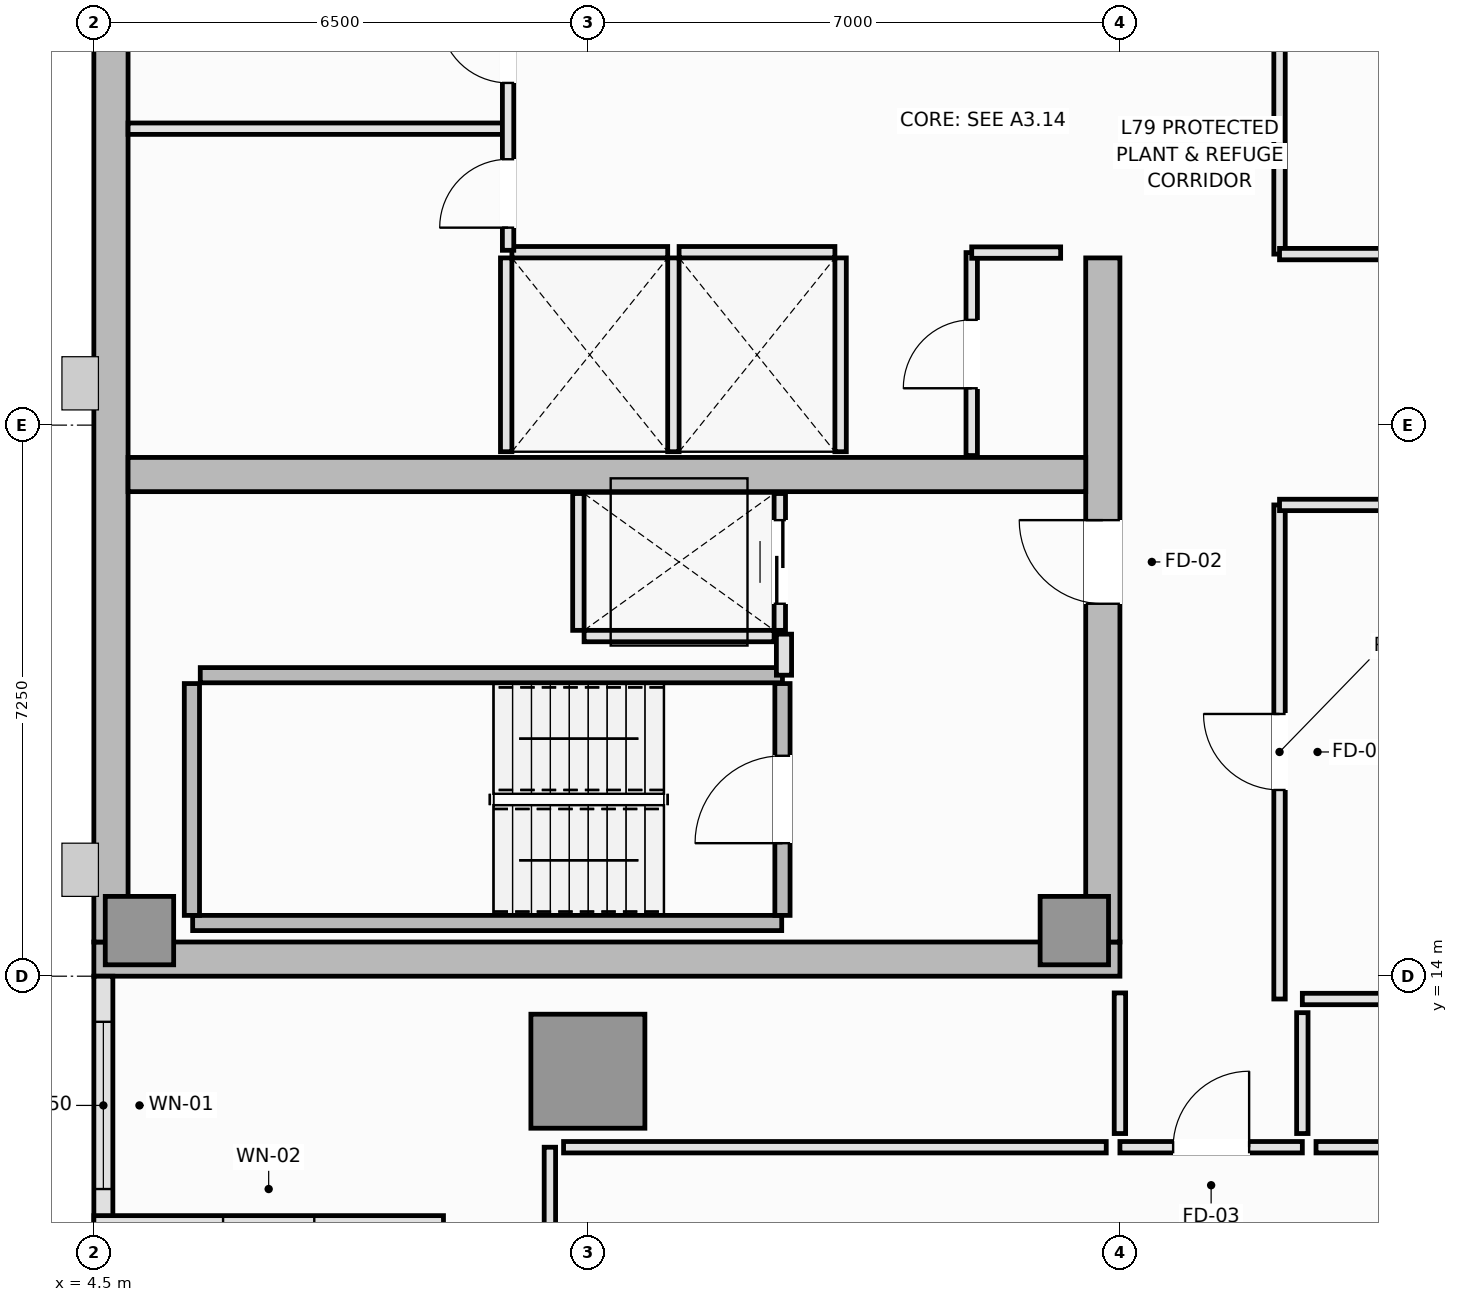
"""IFC4 building model, lengths in metres.
Left out: names, types, materials, properties, quantities, classifications, styles, units other than length and angle.
Written with IfcOpenShell. Run it as: python <this file> out.ifc"""

import sys

from ifc_helpers import new_model, si_unit, direction, frame, frame_2d, origin, origin_2d, place, context, subcontext, project, spatial, rectangle, extrude, element, fill, save


model = new_model("IFC4")
c1 = context("Model", 3, precision=1e-05, world=origin(), true_north=direction((0.0, 1.0)))
c2 = subcontext(c1, "Body", "Model", "MODEL_VIEW")
j1 = project(units=[si_unit("LENGTHUNIT", "METRE"), si_unit("PLANEANGLEUNIT", "RADIAN")], contexts=[c1])
p1 = place(None, origin())
s1 = spatial("IfcSite", under=j1, at=p1, CompositionType="ELEMENT")
p2 = place(p1, origin())
s2 = spatial("IfcBuilding", under=s1, at=p2, CompositionType="ELEMENT")
p3 = place(p2, frame((0.0, 0.0, 296.65)))
s3 = spatial("IfcBuildingStorey", under=s2, at=p3, CompositionType="ELEMENT", Elevation=296.65)
p4 = place(p3, frame((4.5, 14.225, 0.0), z_axis=(0.0, 0.0, 1.0), x_axis=(1.0, 0.0, 0.0)))
e1 = element("IfcWall", 1, at=p4, inside=s3, PredefinedType="SHEAR", context=c2, shape_type="SweptSolid", body=[
    extrude(rectangle(XDim=13.5, YDim=0.45, at=frame_2d((6.75, 0.0))), origin(), (0.0, 0.0, 1.0), 6.4),
])
p5 = place(p3, frame((4.725, 14.45, 0.0), z_axis=(0.0, 0.0, 1.0), x_axis=(0.0, 1.0, 0.0)))
e2 = element("IfcWall", 2, at=p5, inside=s3, PredefinedType="SHEAR", context=c2, shape_type="SweptSolid", body=[
    extrude(rectangle(XDim=21.6, YDim=0.45, at=frame_2d((10.8, 0.0))), origin(), (0.0, 0.0, 1.0), 6.4),
])
p6 = place(p3, frame((17.775, 14.45, 0.0), z_axis=(0.0, 0.0, 1.0), x_axis=(0.0, 1.0, 0.0)))
e3 = element("IfcWall", 3, at=p6, inside=s3, PredefinedType="SHEAR", context=c2, shape_type="SweptSolid", body=[
    extrude(rectangle(XDim=9.0, YDim=0.45, at=frame_2d((4.5, 0.0))), origin(), (0.0, 0.0, 1.0), 6.4),
])
p7 = place(p6, frame((4.45, 0.0, 0.0)))
e4 = element("IfcOpeningElement", 4, at=p7, cuts=e3, PredefinedType="OPENING", context=c2, shape_type="SweptSolid", body=[
    extrude(rectangle(XDim=1.1, YDim=2.15, at=frame_2d((0.55, 1.075))), frame((0.0, 0.235, 0.0), z_axis=(0.0, -1.0, 0.0), x_axis=(1.0, 0.0, 0.0)), (0.0, 0.0, 1.0), 0.47),
])
p8 = place(p3, frame((4.95, 20.6, 0.0), z_axis=(0.0, 0.0, 1.0), x_axis=(1.0, 0.0, 0.0)))
e5 = element("IfcWall", 5, at=p8, inside=s3, PredefinedType="SHEAR", context=c2, shape_type="SweptSolid", body=[
    extrude(rectangle(XDim=12.6, YDim=0.45, at=frame_2d((6.3, 0.0))), origin(), (0.0, 0.0, 1.0), 6.4),
])
for number, where, z_axis, x_axis in (
    (6, (5.1, 14.6, 0.0), (0.0, 0.0, 1.0), (1.0, 0.0, 0.0)),
    (7, (17.4, 14.6, 0.0), (0.0, 0.0, 1.0), (1.0, 0.0, 0.0)),
):
    element("IfcColumn", number, at=place(p3, frame(where, z_axis=z_axis, x_axis=x_axis)), inside=s3, PredefinedType="PILASTER", context=c2, shape_type="SweptSolid", body=[
        extrude(rectangle(XDim=0.9, YDim=0.9, at=origin_2d()), origin(), (0.0, 0.0, 1.0), 6.4),
    ])
p9 = place(p3, frame((11.0, 12.75, 0.0), z_axis=(0.0, 0.0, 1.0), x_axis=(1.0, 0.0, 0.0)))
e8 = element("IfcColumn", 8, at=p9, inside=s3, PredefinedType="COLUMN", context=c2, shape_type="SweptSolid", body=[
    extrude(rectangle(XDim=1.5, YDim=1.5, at=origin_2d()), origin(), (0.0, 0.0, 1.0), 6.4),
])
p10 = place(p3, frame((4.625, 14.0, 0.0), z_axis=(0.0, 0.0, 1.0), x_axis=(0.0, -1.0, 0.0)))
e9 = element("IfcWall", 9, at=p10, inside=s3, PredefinedType="SOLIDWALL", context=c2, shape_type="SweptSolid", body=[
    extrude(rectangle(XDim=3.4, YDim=0.25, at=frame_2d((1.7, 0.0))), origin(), (0.0, 0.0, 1.0), 6.2),
])
p11 = place(p10, frame((0.6, 0.0, 0.9)))
e10 = element("IfcOpeningElement", 10, at=p11, cuts=e9, PredefinedType="OPENING", context=c2, shape_type="SweptSolid", body=[
    extrude(rectangle(XDim=2.2, YDim=1.8, at=frame_2d((1.1, 0.9))), frame((0.0, 0.135, 0.0), z_axis=(0.0, -1.0, 0.0), x_axis=(1.0, 0.0, 0.0)), (0.0, 0.0, 1.0), 0.27),
])
p12 = place(p3, frame((4.5, 10.725, 0.0), z_axis=(0.0, 0.0, 1.0), x_axis=(1.0, 0.0, 0.0)))
e11 = element("IfcWall", 11, at=p12, inside=s3, PredefinedType="SOLIDWALL", context=c2, shape_type="SweptSolid", body=[
    extrude(rectangle(XDim=4.6, YDim=0.25, at=frame_2d((2.3, 0.0))), origin(), (0.0, 0.0, 1.0), 6.2),
])
p13 = place(p12, frame((1.7, 0.0, 0.9)))
e12 = element("IfcOpeningElement", 12, at=p13, cuts=e11, PredefinedType="OPENING", context=c2, shape_type="SweptSolid", body=[
    extrude(rectangle(XDim=1.2, YDim=1.8, at=frame_2d((0.6, 0.9))), frame((0.0, 0.135, 0.0), z_axis=(0.0, -1.0, 0.0), x_axis=(1.0, 0.0, 0.0)), (0.0, 0.0, 1.0), 0.27),
])
p14 = place(p3, frame((5.8, 14.7, 0.0), z_axis=(0.0, 0.0, 1.0), x_axis=(1.0, 0.0, 0.0)))
e13 = element("IfcWall", 13, at=p14, inside=s3, PredefinedType="SOLIDWALL", context=c2, shape_type="SweptSolid", body=[
    extrude(rectangle(XDim=7.75, YDim=0.2, at=frame_2d((3.875, 0.0))), origin(), (0.0, 0.0, 1.0), 6.4),
])
p15 = place(p3, frame((5.79, 14.8, 0.0), z_axis=(0.0, 0.0, 1.0), x_axis=(0.0, 1.0, 0.0)))
e14 = element("IfcWall", 14, at=p15, inside=s3, PredefinedType="SOLIDWALL", context=c2, shape_type="SweptSolid", body=[
    extrude(rectangle(XDim=3.05, YDim=0.2, at=frame_2d((1.525, 0.0))), origin(), (0.0, 0.0, 1.0), 6.4),
])
p16 = place(p3, frame((5.9, 17.96, 0.0), z_axis=(0.0, 0.0, 1.0), x_axis=(1.0, 0.0, 0.0)))
e15 = element("IfcWall", 15, at=p16, inside=s3, PredefinedType="SOLIDWALL", context=c2, shape_type="SweptSolid", body=[
    extrude(rectangle(XDim=7.66, YDim=0.2, at=frame_2d((3.83, 0.0))), origin(), (0.0, 0.0, 1.0), 6.4),
])
p17 = place(p3, frame((13.56, 14.8, 0.0), z_axis=(0.0, 0.0, 1.0), x_axis=(0.0, 1.0, 0.0)))
e16 = element("IfcWall", 16, at=p17, inside=s3, PredefinedType="SOLIDWALL", context=c2, shape_type="SweptSolid", body=[
    extrude(rectangle(XDim=3.05, YDim=0.2, at=frame_2d((1.525, 0.0))), origin(), (0.0, 0.0, 1.0), 6.4),
])
p18 = place(p17, frame((0.95, 0.0, 0.0)))
e17 = element("IfcOpeningElement", 17, at=p18, cuts=e16, PredefinedType="OPENING", context=c2, shape_type="SweptSolid", body=[
    extrude(rectangle(XDim=1.15, YDim=2.15, at=frame_2d((0.575, 1.075))), frame((0.0, 0.11, 0.0), z_axis=(0.0, -1.0, 0.0), x_axis=(1.0, 0.0, 0.0)), (0.0, 0.0, 1.0), 0.22),
])
p19 = place(p3, frame((10.0, 23.525, 0.0), z_axis=(0.0, 0.0, 1.0), x_axis=(1.0, 0.0, 0.0)))
e18 = element("IfcWall", 18, at=p19, inside=s3, PredefinedType="PARTITIONING", context=c2, shape_type="SweptSolid", body=[
    extrude(rectangle(XDim=2.05, YDim=0.15, at=frame_2d((1.025, 0.0))), origin(), (0.0, 0.0, 1.0), 6.2),
])
for number, where, z_axis, x_axis in (
    (19, (9.925, 20.9, 0.0), (0.0, 0.0, 1.0), (0.0, 1.0, 0.0)),
    (20, (12.125, 20.9, 0.0), (0.0, 0.0, 1.0), (0.0, 1.0, 0.0)),
):
    element("IfcWall", number, at=place(p3, frame(where, z_axis=z_axis, x_axis=x_axis)), inside=s3, PredefinedType="PARTITIONING", context=c2, shape_type="SweptSolid", body=[
        extrude(rectangle(XDim=2.55, YDim=0.15, at=frame_2d((1.275, 0.0))), origin(), (0.0, 0.0, 1.0), 6.2),
    ])
p20 = place(p3, frame((12.2, 23.525, 0.0), z_axis=(0.0, 0.0, 1.0), x_axis=(1.0, 0.0, 0.0)))
e21 = element("IfcWall", 21, at=p20, inside=s3, PredefinedType="PARTITIONING", context=c2, shape_type="SweptSolid", body=[
    extrude(rectangle(XDim=2.05, YDim=0.15, at=frame_2d((1.025, 0.0))), origin(), (0.0, 0.0, 1.0), 6.2),
])
p21 = place(p3, frame((14.325, 20.9, 0.0), z_axis=(0.0, 0.0, 1.0), x_axis=(0.0, 1.0, 0.0)))
e22 = element("IfcWall", 22, at=p21, inside=s3, PredefinedType="PARTITIONING", context=c2, shape_type="SweptSolid", body=[
    extrude(rectangle(XDim=2.55, YDim=0.15, at=frame_2d((1.275, 0.0))), origin(), (0.0, 0.0, 1.0), 6.2),
])
p22 = place(p3, frame((10.95, 18.475, 0.0), z_axis=(0.0, 0.0, 1.0), x_axis=(1.0, 0.0, 0.0)))
e23 = element("IfcWall", 23, at=p22, inside=s3, PredefinedType="PARTITIONING", context=c2, shape_type="SweptSolid", body=[
    extrude(rectangle(XDim=2.5, YDim=0.15, at=frame_2d((1.25, 0.0))), origin(), (0.0, 0.0, 1.0), 6.2),
])
p23 = place(p3, frame((10.875, 18.55, 0.0), z_axis=(0.0, 0.0, 1.0), x_axis=(0.0, 1.0, 0.0)))
e24 = element("IfcWall", 24, at=p23, inside=s3, PredefinedType="PARTITIONING", context=c2, shape_type="SweptSolid", body=[
    extrude(rectangle(XDim=1.8, YDim=0.15, at=frame_2d((0.9, 0.0))), origin(), (0.0, 0.0, 1.0), 6.2),
])
p24 = place(p3, frame((13.525, 18.55, 0.0), z_axis=(0.0, 0.0, 1.0), x_axis=(0.0, 1.0, 0.0)))
e25 = element("IfcWall", 25, at=p24, inside=s3, PredefinedType="PARTITIONING", context=c2, shape_type="SweptSolid", body=[
    extrude(rectangle(XDim=1.8, YDim=0.15, at=frame_2d((0.9, 0.0))), origin(), (0.0, 0.0, 1.0), 6.2),
])
p25 = place(p24, frame((0.35, 0.0, 0.0)))
e26 = element("IfcOpeningElement", 26, at=p25, cuts=e25, PredefinedType="OPENING", context=c2, shape_type="SweptSolid", body=[
    extrude(rectangle(XDim=1.1, YDim=2.2, at=frame_2d((0.55, 1.1))), frame((0.0, 0.085, 0.0), z_axis=(0.0, -1.0, 0.0), x_axis=(1.0, 0.0, 0.0)), (0.0, 0.0, 1.0), 0.17),
])
p26 = place(p3, frame((13.58, 17.96, 0.0), z_axis=(0.0, 0.0, 1.0), x_axis=(0.0, 1.0, 0.0)))
e27 = element("IfcWall", 27, at=p26, inside=s3, PredefinedType="PARTITIONING", context=c2, shape_type="SweptSolid", body=[
    extrude(rectangle(XDim=0.54, YDim=0.2, at=frame_2d((0.27, 0.0))), origin(), (0.0, 0.0, 1.0), 6.2),
])
p27 = place(p3, frame((4.95, 25.15, 0.0), z_axis=(0.0, 0.0, 1.0), x_axis=(1.0, 0.0, 0.0)))
e28 = element("IfcWall", 28, at=p27, inside=s3, PredefinedType="PARTITIONING", context=c2, shape_type="SweptSolid", body=[
    extrude(rectangle(XDim=5.0, YDim=0.15, at=frame_2d((2.5, 0.0))), origin(), (0.0, 0.0, 1.0), 6.2),
])
p28 = place(p3, frame((9.95, 23.55, 0.0), z_axis=(0.0, 0.0, 1.0), x_axis=(0.0, 1.0, 0.0)))
e29 = element("IfcWall", 29, at=p28, inside=s3, PredefinedType="PARTITIONING", context=c2, shape_type="SweptSolid", body=[
    extrude(rectangle(XDim=3.4, YDim=0.15, at=frame_2d((1.7, 0.0))), origin(), (0.0, 0.0, 1.0), 6.2),
])
p29 = place(p28, frame((0.298, 0.0, 0.0)))
e30 = element("IfcOpeningElement", 30, at=p29, cuts=e29, PredefinedType="OPENING", context=c2, shape_type="SweptSolid", body=[
    extrude(rectangle(XDim=0.9, YDim=2.1, at=frame_2d((0.45, 1.05))), frame((0.0, 0.085, 0.0), z_axis=(0.0, -1.0, 0.0), x_axis=(1.0, 0.0, 0.0)), (0.0, 0.0, 1.0), 0.17),
])
p30 = place(p28, frame((2.202, 0.0, 0.0)))
e31 = element("IfcOpeningElement", 31, at=p30, cuts=e29, PredefinedType="OPENING", context=c2, shape_type="SweptSolid", body=[
    extrude(rectangle(XDim=0.9, YDim=2.1, at=frame_2d((0.45, 1.05))), frame((0.0, 0.085, 0.0), z_axis=(0.0, -1.0, 0.0), x_axis=(1.0, 0.0, 0.0)), (0.0, 0.0, 1.0), 0.17),
])
p31 = place(p3, frame((16.05, 20.85, 0.0), z_axis=(0.0, 0.0, 1.0), x_axis=(0.0, 1.0, 0.0)))
e32 = element("IfcWall", 32, at=p31, inside=s3, PredefinedType="PARTITIONING", context=c2, shape_type="SweptSolid", body=[
    extrude(rectangle(XDim=2.67, YDim=0.15, at=frame_2d((1.335, 0.0))), origin(), (0.0, 0.0, 1.0), 6.2),
])
p32 = place(p31, frame((0.885, 0.0, 0.0)))
e33 = element("IfcOpeningElement", 33, at=p32, cuts=e32, PredefinedType="OPENING", context=c2, shape_type="SweptSolid", body=[
    extrude(rectangle(XDim=0.9, YDim=2.1, at=frame_2d((0.45, 1.05))), frame((0.0, 0.085, 0.0), z_axis=(0.0, -1.0, 0.0), x_axis=(1.0, 0.0, 0.0)), (0.0, 0.0, 1.0), 0.17),
])
p33 = place(p3, frame((16.05, 23.52, 0.0), z_axis=(0.0, 0.0, 1.0), x_axis=(1.0, 0.0, 0.0)))
e34 = element("IfcWall", 34, at=p33, inside=s3, PredefinedType="PARTITIONING", context=c2, shape_type="SweptSolid", body=[
    extrude(rectangle(XDim=1.17, YDim=0.15, at=frame_2d((0.585, 0.0))), origin(), (0.0, 0.0, 1.0), 6.2),
])
p34 = place(p3, frame((20.1, 13.7, 0.0), z_axis=(0.0, 0.0, 1.0), x_axis=(0.0, 1.0, 0.0)))
e35 = element("IfcWall", 35, at=p34, inside=s3, PredefinedType="PARTITIONING", context=c2, shape_type="SweptSolid", body=[
    extrude(rectangle(XDim=6.5, YDim=0.15, at=frame_2d((3.25, 0.0))), origin(), (0.0, 0.0, 1.0), 6.2),
])
p35 = place(p34, frame((2.75, 0.0, 0.0)))
e36 = element("IfcOpeningElement", 36, at=p35, cuts=e35, PredefinedType="OPENING", context=c2, shape_type="SweptSolid", body=[
    extrude(rectangle(XDim=1.0, YDim=2.15, at=frame_2d((0.5, 1.075))), frame((0.0, 0.085, 0.0), z_axis=(0.0, -1.0, 0.0), x_axis=(1.0, 0.0, 0.0)), (0.0, 0.0, 1.0), 0.17),
])
p36 = place(p3, frame((20.1, 23.5, 0.0), z_axis=(0.0, 0.0, 1.0), x_axis=(0.0, 1.0, 0.0)))
e37 = element("IfcWall", 37, at=p36, inside=s3, PredefinedType="PARTITIONING", context=c2, shape_type="SweptSolid", body=[
    extrude(rectangle(XDim=13.3, YDim=0.15, at=frame_2d((6.65, 0.0))), origin(), (0.0, 0.0, 1.0), 6.2),
])
p37 = place(p36, frame((6.15, 0.0, 0.0)))
e38 = element("IfcOpeningElement", 38, at=p37, cuts=e37, PredefinedType="OPENING", context=c2, shape_type="SweptSolid", body=[
    extrude(rectangle(XDim=1.0, YDim=2.15, at=frame_2d((0.5, 1.075))), frame((0.0, 0.085, 0.0), z_axis=(0.0, -1.0, 0.0), x_axis=(1.0, 0.0, 0.0)), (0.0, 0.0, 1.0), 0.17),
])
p38 = place(p3, frame((18.0, 11.75, 0.0), z_axis=(0.0, 0.0, 1.0), x_axis=(1.0, 0.0, 0.0)))
e39 = element("IfcWall", 39, at=p38, inside=s3, PredefinedType="PARTITIONING", context=c2, shape_type="SweptSolid", body=[
    extrude(rectangle(XDim=2.4, YDim=0.15, at=frame_2d((1.2, 0.0))), origin(), (0.0, 0.0, 1.0), 6.2),
])
p39 = place(p38, frame((0.7, 0.0, 0.0)))
e40 = element("IfcOpeningElement", 40, at=p39, cuts=e39, PredefinedType="OPENING", context=c2, shape_type="SweptSolid", body=[
    extrude(rectangle(XDim=1.0, YDim=2.15, at=frame_2d((0.5, 1.075))), frame((0.0, 0.085, 0.0), z_axis=(0.0, -1.0, 0.0), x_axis=(1.0, 0.0, 0.0)), (0.0, 0.0, 1.0), 0.17),
])
for number, where, z_axis, x_axis in (
    (41, (20.1, 20.2, 0.0), (0.0, 0.0, 1.0), (1.0, 0.0, 0.0)),
    (42, (20.1, 23.5, 0.0), (0.0, 0.0, 1.0), (1.0, 0.0, 0.0)),
):
    element("IfcWall", number, at=place(p3, frame(where, z_axis=z_axis, x_axis=x_axis)), inside=s3, PredefinedType="PARTITIONING", context=c2, shape_type="SweptSolid", body=[
        extrude(rectangle(XDim=17.1, YDim=0.15, at=frame_2d((8.55, 0.0))), origin(), (0.0, 0.0, 1.0), 6.2),
    ])
p40 = place(p3, frame((37.02, 13.7, 0.0), z_axis=(0.0, 0.0, 1.0), x_axis=(-1.0, 0.0, 0.0)))
e43 = element("IfcWall", 43, at=p40, inside=s3, PredefinedType="PARTITIONING", context=c2, shape_type="SweptSolid", body=[
    extrude(rectangle(XDim=16.62, YDim=0.15, at=frame_2d((8.31, 0.0))), origin(), (0.0, 0.0, 1.0), 6.2),
])
p41 = place(p3, frame((20.4, 13.52, 0.0), z_axis=(0.0, 0.0, 1.0), x_axis=(0.0, -1.0, 0.0)))
e44 = element("IfcWall", 44, at=p41, inside=s3, PredefinedType="PARTITIONING", context=c2, shape_type="SweptSolid", body=[
    extrude(rectangle(XDim=1.59, YDim=0.15, at=frame_2d((0.795, 0.0))), origin(), (0.0, 0.0, 1.0), 6.2),
])
p42 = place(p3, frame((20.58, 11.75, 0.0), z_axis=(0.0, 0.0, 1.0), x_axis=(1.0, 0.0, 0.0)))
e45 = element("IfcWall", 45, at=p42, inside=s3, PredefinedType="PARTITIONING", context=c2, shape_type="SweptSolid", body=[
    extrude(rectangle(XDim=13.42, YDim=0.15, at=frame_2d((6.71, 0.0))), origin(), (0.0, 0.0, 1.0), 6.2),
])
p43 = place(p3, frame((10.5, 6.32, 0.0), z_axis=(0.0, 0.0, 1.0), x_axis=(0.0, 1.0, 0.0)))
e46 = element("IfcWall", 46, at=p43, inside=s3, PredefinedType="PARTITIONING", context=c2, shape_type="SweptSolid", body=[
    extrude(rectangle(XDim=5.43, YDim=0.15, at=frame_2d((2.715, 0.0))), origin(), (0.0, 0.0, 1.0), 6.2),
])
p44 = place(p3, frame((10.68, 11.75, 0.0), z_axis=(0.0, 0.0, 1.0), x_axis=(1.0, 0.0, 0.0)))
e47 = element("IfcWall", 47, at=p44, inside=s3, PredefinedType="PARTITIONING", context=c2, shape_type="SweptSolid", body=[
    extrude(rectangle(XDim=7.14, YDim=0.15, at=frame_2d((3.57, 0.0))), origin(), (0.0, 0.0, 1.0), 6.2),
])
p45 = place(p3, frame((18.0, 11.93, 0.0), z_axis=(0.0, 0.0, 1.0), x_axis=(0.0, 1.0, 0.0)))
e48 = element("IfcWall", 48, at=p45, inside=s3, PredefinedType="PARTITIONING", context=c2, shape_type="SweptSolid", body=[
    extrude(rectangle(XDim=1.85, YDim=0.15, at=frame_2d((0.925, 0.0))), origin(), (0.0, 0.0, 1.0), 6.2),
])
p46 = place(p11, origin())
e49 = element("IfcWindow", 49, at=p46, inside=s3, PartitioningType="SINGLE_PANEL", PredefinedType="WINDOW", context=c2, shape_type="SweptSolid", body=[
    extrude(rectangle(XDim=2.2, YDim=1.8, at=frame_2d((1.1, 0.9))), frame((0.0, 0.03, 0.0), z_axis=(0.0, -1.0, 0.0), x_axis=(1.0, 0.0, 0.0)), (0.0, 0.0, 1.0), 0.06),
])
fill(e10, e49)
p47 = place(p13, origin())
e50 = element("IfcWindow", 50, at=p47, inside=s3, PartitioningType="SINGLE_PANEL", PredefinedType="WINDOW", context=c2, shape_type="SweptSolid", body=[
    extrude(rectangle(XDim=1.2, YDim=1.8, at=frame_2d((0.6, 0.9))), frame((0.0, 0.03, 0.0), z_axis=(0.0, -1.0, 0.0), x_axis=(1.0, 0.0, 0.0)), (0.0, 0.0, 1.0), 0.06),
])
fill(e12, e50)
p48 = place(p18, origin())
e51 = element("IfcDoor", 51, at=p48, inside=s3, OperationType="SINGLE_SWING_LEFT", PredefinedType="DOOR", context=c2, shape_type="SweptSolid", body=[
    extrude(rectangle(XDim=1.15, YDim=2.15, at=frame_2d((0.575, 1.075))), frame((0.0, 0.025, 0.0), z_axis=(0.0, -1.0, 0.0), x_axis=(1.0, 0.0, 0.0)), (0.0, 0.0, 1.0), 0.05),
])
fill(e17, e51)
p49 = place(p25, origin())
e52 = element("IfcDoor", 52, at=p49, inside=s3, OperationType="DOUBLE_DOOR_SLIDING", PredefinedType="DOOR", context=c2, shape_type="SweptSolid", body=[
    extrude(rectangle(XDim=1.1, YDim=2.2, at=frame_2d((0.55, 1.1))), frame((0.0, 0.025, 0.0), z_axis=(0.0, -1.0, 0.0), x_axis=(1.0, 0.0, 0.0)), (0.0, 0.0, 1.0), 0.05),
])
fill(e26, e52)
p50 = place(p7, origin())
e53 = element("IfcDoor", 53, at=p50, inside=s3, OperationType="SINGLE_SWING_RIGHT", PredefinedType="DOOR", context=c2, shape_type="SweptSolid", body=[
    extrude(rectangle(XDim=1.1, YDim=2.15, at=frame_2d((0.55, 1.075))), frame((0.0, 0.025, 0.0), z_axis=(0.0, -1.0, 0.0), x_axis=(1.0, 0.0, 0.0)), (0.0, 0.0, 1.0), 0.05),
])
fill(e4, e53)
p51 = place(p29, origin())
e54 = element("IfcDoor", 54, at=p51, inside=s3, OperationType="SINGLE_SWING_LEFT", PredefinedType="DOOR", context=c2, shape_type="SweptSolid", body=[
    extrude(rectangle(XDim=0.9, YDim=2.1, at=frame_2d((0.45, 1.05))), frame((0.0, 0.025, 0.0), z_axis=(0.0, -1.0, 0.0), x_axis=(1.0, 0.0, 0.0)), (0.0, 0.0, 1.0), 0.05),
])
fill(e30, e54)
p52 = place(p30, origin())
e55 = element("IfcDoor", 55, at=p52, inside=s3, OperationType="SINGLE_SWING_RIGHT", PredefinedType="DOOR", context=c2, shape_type="SweptSolid", body=[
    extrude(rectangle(XDim=0.9, YDim=2.1, at=frame_2d((0.45, 1.05))), frame((0.0, 0.025, 0.0), z_axis=(0.0, -1.0, 0.0), x_axis=(1.0, 0.0, 0.0)), (0.0, 0.0, 1.0), 0.05),
])
fill(e31, e55)
p53 = place(p32, origin())
e56 = element("IfcDoor", 56, at=p53, inside=s3, OperationType="SINGLE_SWING_LEFT", PredefinedType="DOOR", context=c2, shape_type="SweptSolid", body=[
    extrude(rectangle(XDim=0.9, YDim=2.1, at=frame_2d((0.45, 1.05))), frame((0.0, 0.025, 0.0), z_axis=(0.0, -1.0, 0.0), x_axis=(1.0, 0.0, 0.0)), (0.0, 0.0, 1.0), 0.05),
])
fill(e33, e56)
p54 = place(p35, origin())
e57 = element("IfcDoor", 57, at=p54, inside=s3, OperationType="SINGLE_SWING_RIGHT", PredefinedType="DOOR", context=c2, shape_type="SweptSolid", body=[
    extrude(rectangle(XDim=1.0, YDim=2.15, at=frame_2d((0.5, 1.075))), frame((0.0, 0.025, 0.0), z_axis=(0.0, -1.0, 0.0), x_axis=(1.0, 0.0, 0.0)), (0.0, 0.0, 1.0), 0.05),
])
fill(e36, e57)
p55 = place(p39, origin())
e58 = element("IfcDoor", 58, at=p55, inside=s3, OperationType="SINGLE_SWING_RIGHT", PredefinedType="DOOR", context=c2, shape_type="SweptSolid", body=[
    extrude(rectangle(XDim=1.0, YDim=2.15, at=frame_2d((0.5, 1.075))), frame((0.0, 0.025, 0.0), z_axis=(0.0, -1.0, 0.0), x_axis=(1.0, 0.0, 0.0)), (0.0, 0.0, 1.0), 0.05),
])
fill(e40, e58)
save(model, sys.argv[1])
